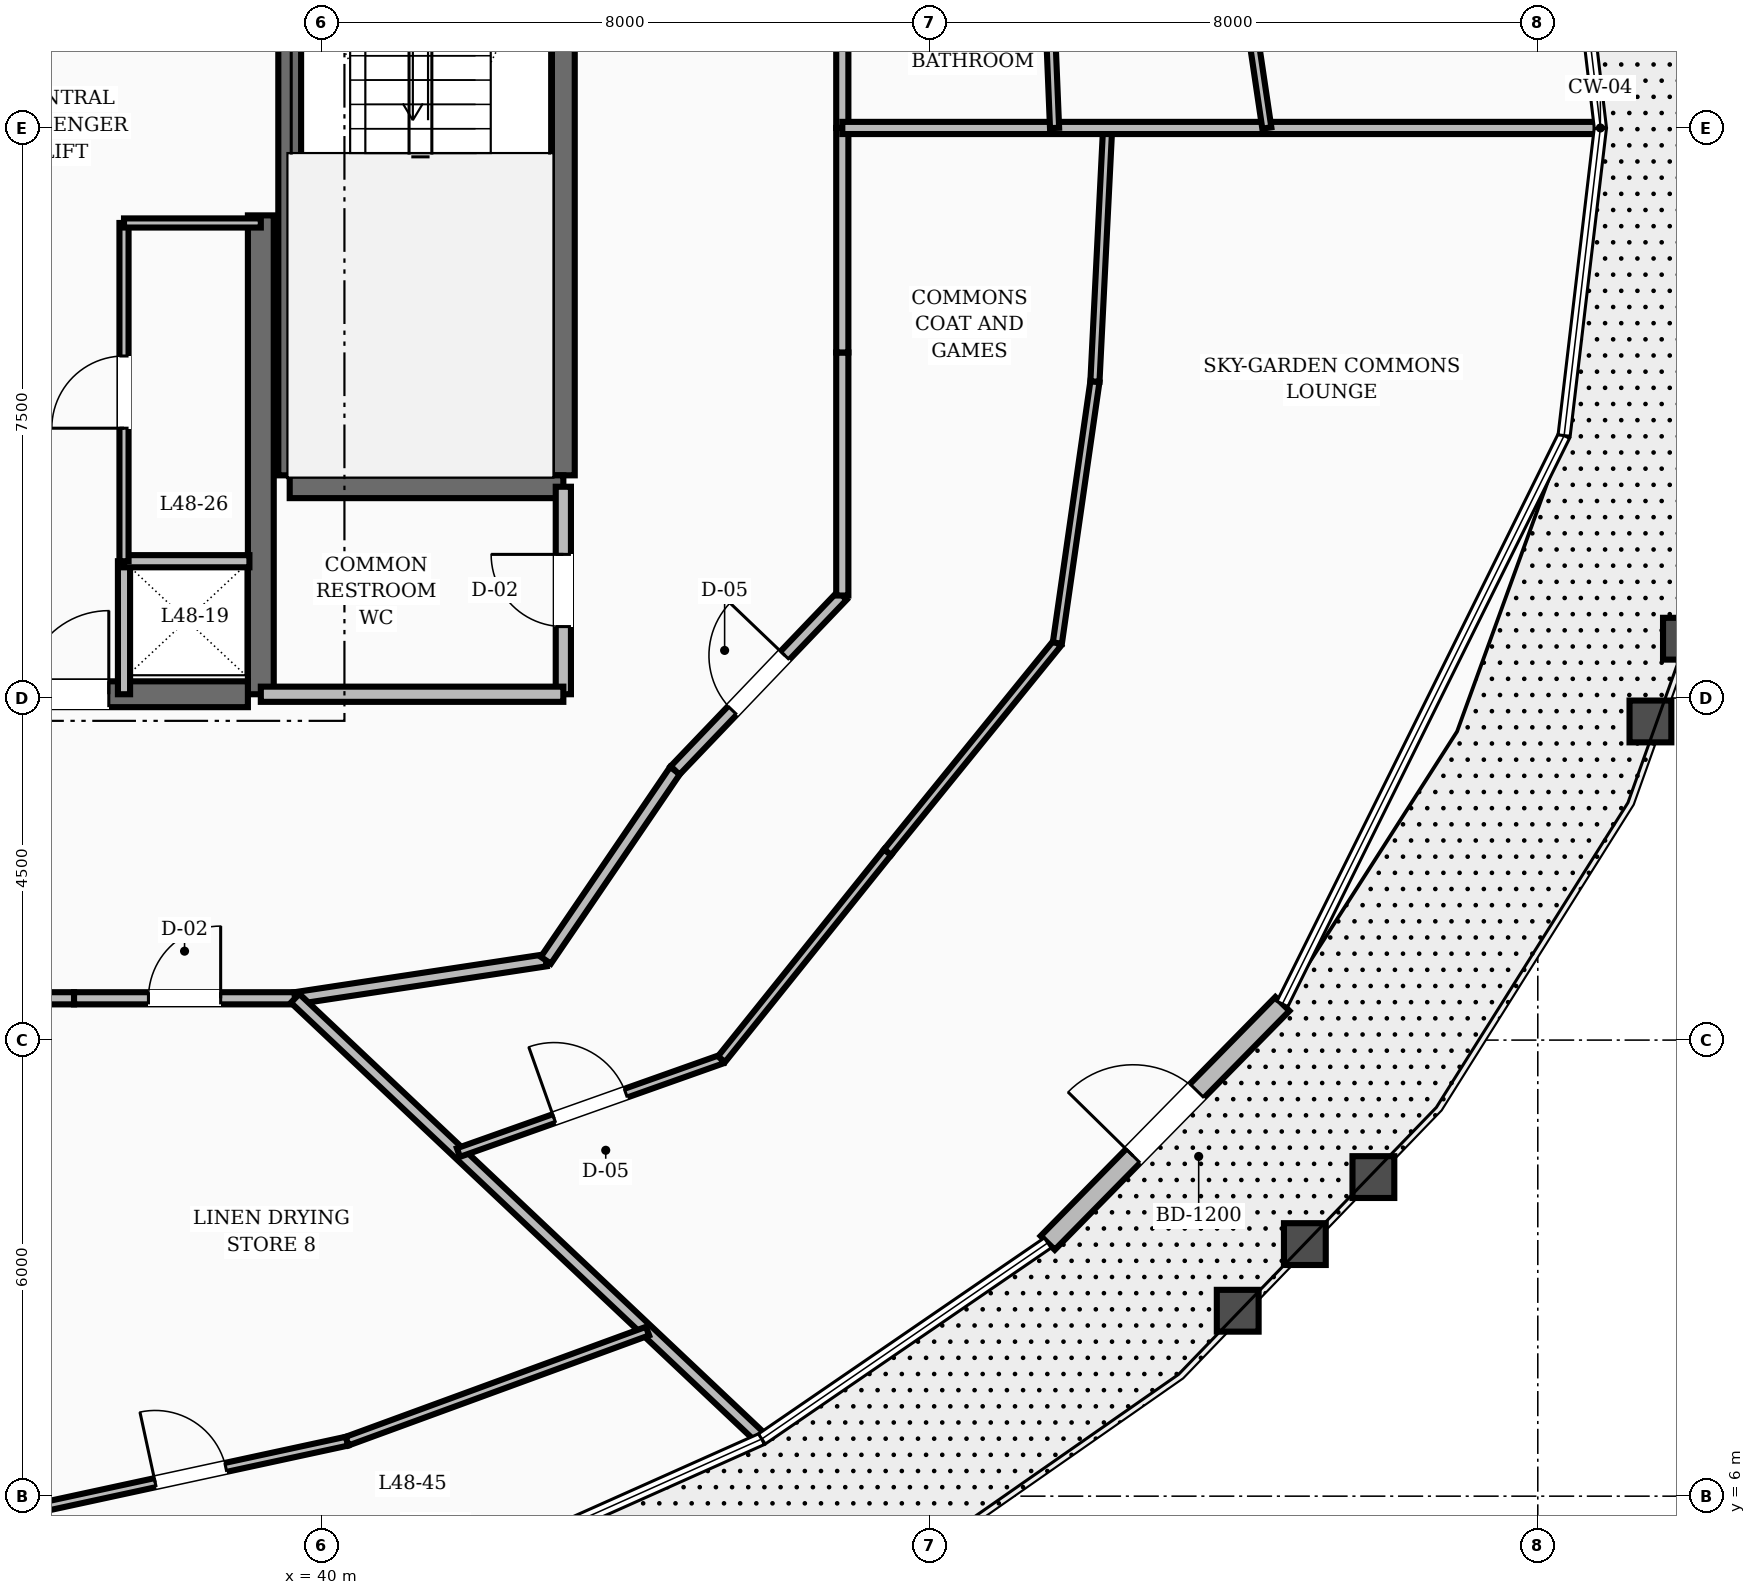
"""IFC4 building model, lengths in metres.
Left out: names, types, materials, properties, quantities, classifications, styles, units other than length and angle.
Written with IfcOpenShell. Run it as: python <this file> out.ifc"""

import sys

from ifc_helpers import new_model, si_unit, direction, frame, frame_2d, origin, place, context, subcontext, project, spatial, rectangle, extrude, element, fill, save


model = new_model("IFC4")
c1 = context("Model", 3, precision=1e-05, world=origin(), true_north=direction((0.0, 1.0)))
c2 = subcontext(c1, "Body", "Model", "MODEL_VIEW")
j1 = project(units=[si_unit("LENGTHUNIT", "METRE"), si_unit("PLANEANGLEUNIT", "RADIAN")], contexts=[c1])
p1 = place(None, origin())
s1 = spatial("IfcSite", under=j1, at=p1, CompositionType="ELEMENT")
p2 = place(p1, origin())
s2 = spatial("IfcBuilding", under=s1, at=p2, CompositionType="ELEMENT")
p3 = place(p2, frame((0.0, 0.0, 185.6)))
s3 = spatial("IfcBuildingStorey", under=s2, at=p3, CompositionType="ELEMENT", Elevation=185.6)
p4 = place(p3, frame((39.2, 16.55, 0.0), z_axis=(0.0, 0.0, 1.0), x_axis=(0.0, 1.0, 0.0)))
e1 = element("IfcWall", 1, at=p4, inside=s3, PredefinedType="SHEAR", context=c2, shape_type="SweptSolid", body=[
    extrude(rectangle(XDim=6.3, YDim=0.34, at=frame_2d((3.15, 0.0))), origin(), (0.0, 0.0, 1.0), 3.6),
])
p5 = place(p3, frame((35.8, 16.55, 0.0), z_axis=(0.0, 0.0, 1.0), x_axis=(1.0, 0.0, 0.0)))
e2 = element("IfcWall", 2, at=p5, inside=s3, PredefinedType="SHEAR", context=c2, shape_type="SweptSolid", body=[
    extrude(rectangle(XDim=3.23, YDim=0.34, at=frame_2d((1.615, 0.0))), origin(), (0.0, 0.0, 1.0), 3.6),
])
p6 = place(p5, frame((0.3, 0.0, 0.0)))
e3 = element("IfcOpeningElement", 3, at=p6, cuts=e2, PredefinedType="OPENING", context=c2, shape_type="SweptSolid", body=[
    extrude(rectangle(XDim=1.1, YDim=2.1, at=frame_2d((0.55, 1.05))), frame((0.0, 0.18, 0.0), z_axis=(0.0, -1.0, 0.0), x_axis=(1.0, 0.0, 0.0)), (0.0, 0.0, 1.0), 0.36),
])
for number, where, z_axis, x_axis in (
    (4, (43.18, 19.43, 0.0), (0.0, 0.0, 1.0), (0.0, 1.0, 0.0)),
    (5, (39.58, 19.43, 0.0), (0.0, 0.0, 1.0), (0.0, 1.0, 0.0)),
):
    element("IfcWall", number, at=place(p3, frame(where, z_axis=z_axis, x_axis=x_axis)), inside=s3, PredefinedType="SHEAR", context=c2, shape_type="SweptSolid", body=[
        extrude(rectangle(XDim=8.74, YDim=0.3, at=frame_2d((4.37, 0.0))), origin(), (0.0, 0.0, 1.0), 3.6),
    ])
p7 = place(p3, frame((39.58, 19.28, 0.0), z_axis=(0.0, 0.0, 1.0), x_axis=(1.0, 0.0, 0.0)))
e6 = element("IfcWall", 6, at=p7, inside=s3, PredefinedType="SHEAR", context=c2, shape_type="SweptSolid", body=[
    extrude(rectangle(XDim=3.6, YDim=0.3, at=frame_2d((1.8, 0.0))), origin(), (0.0, 0.0, 1.0), 3.6),
])
p8 = place(p3, frame((49.553, 9.332, 0.0), z_axis=(0.0, 0.0, 1.0), x_axis=(0.700677794734, 0.713477839857, 0.0)))
e7 = element("IfcWall", 7, at=p8, inside=s3, PredefinedType="STANDARD", context=c2, shape_type="SweptSolid", body=[
    extrude(rectangle(XDim=4.406, YDim=0.26, at=frame_2d((2.203, 0.0))), origin(), (0.0, 0.0, 1.0), 2.82),
])
p9 = place(p8, frame((1.603, 0.0, 0.0)))
e8 = element("IfcOpeningElement", 8, at=p9, cuts=e7, PredefinedType="OPENING", context=c2, shape_type="SweptSolid", body=[
    extrude(rectangle(XDim=1.2, YDim=2.15, at=frame_2d((0.6, 1.075))), frame((0.0, 0.14, 0.0), z_axis=(0.0, -1.0, 0.0), x_axis=(1.0, 0.0, 0.0)), (0.0, 0.0, 1.0), 0.28),
])
p10 = place(p3, frame((43.18, 16.55, 0.0), z_axis=(0.0, 0.0, 1.0), x_axis=(0.0, 1.0, 0.0)))
e9 = element("IfcWall", 9, at=p10, inside=s3, PredefinedType="SOLIDWALL", context=c2, shape_type="SweptSolid", body=[
    extrude(rectangle(XDim=2.73, YDim=0.2, at=frame_2d((1.365, 0.0))), origin(), (0.0, 0.0, 1.0), 2.8),
])
p11 = place(p10, frame((0.89, 0.0, 0.0)))
e10 = element("IfcOpeningElement", 10, at=p11, cuts=e9, PredefinedType="OPENING", context=c2, shape_type="SweptSolid", body=[
    extrude(rectangle(XDim=0.95, YDim=2.1, at=frame_2d((0.475, 1.05))), frame((0.0, 0.11, 0.0), z_axis=(0.0, -1.0, 0.0), x_axis=(1.0, 0.0, 0.0)), (0.0, 0.0, 1.0), 0.22),
])
p12 = place(p3, frame((39.2, 16.55, 0.0), z_axis=(0.0, 0.0, 1.0), x_axis=(1.0, 0.0, 0.0)))
e11 = element("IfcWall", 11, at=p12, inside=s3, PredefinedType="SOLIDWALL", context=c2, shape_type="SweptSolid", body=[
    extrude(rectangle(XDim=3.98, YDim=0.2, at=frame_2d((1.99, 0.0))), origin(), (0.0, 0.0, 1.0), 2.8),
])
p13 = place(p3, frame((37.4, 16.55, 0.0), z_axis=(0.0, 0.0, 1.0), x_axis=(0.0, 1.0, 0.0)))
e12 = element("IfcWall", 12, at=p13, inside=s3, PredefinedType="SOLIDWALL", context=c2, shape_type="SweptSolid", body=[
    extrude(rectangle(XDim=1.75, YDim=0.16, at=frame_2d((0.875, 0.0))), origin(), (0.0, 0.0, 1.0), 2.8),
])
p14 = place(p3, frame((37.4, 18.3, 0.0), z_axis=(0.0, 0.0, 1.0), x_axis=(1.0, 0.0, 0.0)))
e13 = element("IfcWall", 13, at=p14, inside=s3, PredefinedType="SOLIDWALL", context=c2, shape_type="SweptSolid", body=[
    extrude(rectangle(XDim=1.65, YDim=0.16, at=frame_2d((0.825, 0.0))), origin(), (0.0, 0.0, 1.0), 2.8),
])
p15 = place(p3, frame((37.4, 18.3, 0.0), z_axis=(0.0, 0.0, 1.0), x_axis=(0.0, 1.0, 0.0)))
e14 = element("IfcWall", 14, at=p15, inside=s3, PredefinedType="PARTITIONING", context=c2, shape_type="SweptSolid", body=[
    extrude(rectangle(XDim=4.45, YDim=0.12, at=frame_2d((2.225, 0.0))), origin(), (0.0, 0.0, 1.0), 2.8),
])
p16 = place(p15, frame((1.75, 0.0, 0.0)))
e15 = element("IfcOpeningElement", 15, at=p16, cuts=e14, PredefinedType="OPENING", context=c2, shape_type="SweptSolid", body=[
    extrude(rectangle(XDim=0.95, YDim=2.1, at=frame_2d((0.475, 1.05))), frame((0.0, 0.07, 0.0), z_axis=(0.0, -1.0, 0.0), x_axis=(1.0, 0.0, 0.0)), (0.0, 0.0, 1.0), 0.14),
])
p17 = place(p3, frame((37.4, 22.75, 0.0), z_axis=(0.0, 0.0, 1.0), x_axis=(1.0, 0.0, 0.0)))
e16 = element("IfcWall", 16, at=p17, inside=s3, PredefinedType="PARTITIONING", context=c2, shape_type="SweptSolid", body=[
    extrude(rectangle(XDim=1.8, YDim=0.12, at=frame_2d((0.9, 0.0))), origin(), (0.0, 0.0, 1.0), 2.8),
])
p18 = place(p3, frame((46.85, 24.0, 0.0), z_axis=(0.0, 0.0, 1.0), x_axis=(0.0, 1.0, 0.0)))
e17 = element("IfcWall", 17, at=p18, inside=s3, PredefinedType="SOLIDWALL", context=c2, shape_type="SweptSolid", body=[
    extrude(rectangle(XDim=2.954, YDim=0.16, at=frame_2d((1.477, 0.0))), origin(), (0.0, 0.0, 1.0), 2.8),
])
p19 = place(p3, frame((34.278, 12.55, 0.0), z_axis=(0.0, 0.0, 1.0), x_axis=(1.0, 0.0, 0.0)))
e18 = element("IfcWall", 18, at=p19, inside=s3, PredefinedType="SOLIDWALL", context=c2, shape_type="SweptSolid", body=[
    extrude(rectangle(XDim=2.465, YDim=0.16, at=frame_2d((1.232, 0.0))), origin(), (0.0, 0.0, 1.0), 2.8),
])
p20 = place(p3, frame((36.743, 12.55, 0.0), z_axis=(0.0, 0.0, 1.0), x_axis=(1.0, 0.0, 0.0)))
e19 = element("IfcWall", 19, at=p20, inside=s3, PredefinedType="SOLIDWALL", context=c2, shape_type="SweptSolid", body=[
    extrude(rectangle(XDim=2.908, YDim=0.16, at=frame_2d((1.454, 0.0))), origin(), (0.0, 0.0, 1.0), 2.8),
])
p21 = place(p20, frame((0.979, 0.0, 0.0)))
e20 = element("IfcOpeningElement", 20, at=p21, cuts=e19, PredefinedType="OPENING", context=c2, shape_type="SweptSolid", body=[
    extrude(rectangle(XDim=0.95, YDim=2.1, at=frame_2d((0.475, 1.05))), frame((0.0, 0.09, 0.0), z_axis=(0.0, -1.0, 0.0), x_axis=(1.0, 0.0, 0.0)), (0.0, 0.0, 1.0), 0.18),
])
p22 = place(p3, frame((39.651, 12.55, 0.0), z_axis=(0.0, 0.0, 1.0), x_axis=(0.988710906508, 0.149835721217, 0.0)))
e21 = element("IfcWall", 21, at=p22, inside=s3, PredefinedType="SOLIDWALL", context=c2, shape_type="SweptSolid", body=[
    extrude(rectangle(XDim=3.337, YDim=0.16, at=frame_2d((1.668, 0.0))), origin(), (0.0, 0.0, 1.0), 2.8),
])
p23 = place(p3, frame((42.95, 13.05, 0.0), z_axis=(0.0, 0.0, 1.0), x_axis=(0.562674669208, 0.826678423955, 0.0)))
e22 = element("IfcWall", 22, at=p23, inside=s3, PredefinedType="SOLIDWALL", context=c2, shape_type="SweptSolid", body=[
    extrude(rectangle(XDim=3.021, YDim=0.16, at=frame_2d((1.511, 0.0))), origin(), (0.0, 0.0, 1.0), 2.8),
])
p24 = place(p3, frame((44.65, 15.548, 0.0), z_axis=(0.0, 0.0, 1.0), x_axis=(0.691055487108, 0.722801711216, 0.0)))
e23 = element("IfcWall", 23, at=p24, inside=s3, PredefinedType="SOLIDWALL", context=c2, shape_type="SweptSolid", body=[
    extrude(rectangle(XDim=3.184, YDim=0.16, at=frame_2d((1.592, 0.0))), origin(), (0.0, 0.0, 1.0), 2.8),
])
p25 = place(p24, frame((1.092, 0.0, 0.0)))
e24 = element("IfcOpeningElement", 24, at=p25, cuts=e23, PredefinedType="OPENING", context=c2, shape_type="SweptSolid", body=[
    extrude(rectangle(XDim=1.0, YDim=2.1, at=frame_2d((0.5, 1.05))), frame((0.0, 0.09, 0.0), z_axis=(0.0, -1.0, 0.0), x_axis=(1.0, 0.0, 0.0)), (0.0, 0.0, 1.0), 0.18),
])
p26 = place(p3, frame((46.85, 17.849, 0.0), z_axis=(0.0, 0.0, 1.0), x_axis=(0.0, 1.0, 0.0)))
e25 = element("IfcWall", 25, at=p26, inside=s3, PredefinedType="SOLIDWALL", context=c2, shape_type="SweptSolid", body=[
    extrude(rectangle(XDim=3.197, YDim=0.16, at=frame_2d((1.599, 0.0))), origin(), (0.0, 0.0, 1.0), 2.8),
])
p27 = place(p3, frame((46.85, 21.046, 0.0), z_axis=(0.0, 0.0, 1.0), x_axis=(0.0, 1.0, 0.0)))
e26 = element("IfcWall", 26, at=p27, inside=s3, PredefinedType="SOLIDWALL", context=c2, shape_type="SweptSolid", body=[
    extrude(rectangle(XDim=2.954, YDim=0.16, at=frame_2d((1.477, 0.0))), origin(), (0.0, 0.0, 1.0), 2.8),
])
p28 = place(p3, frame((39.651, 12.55, 0.0), z_axis=(0.0, 0.0, 1.0), x_axis=(0.727100249426, -0.686531301024, 0.0)))
e27 = element("IfcWall", 27, at=p28, inside=s3, PredefinedType="SOLIDWALL", context=c2, shape_type="SweptSolid", body=[
    extrude(rectangle(XDim=8.395, YDim=0.16, at=frame_2d((4.198, 0.0))), origin(), (0.0, 0.0, 1.0), 2.8),
])
p29 = place(p3, frame((41.8, 10.521, 0.0), z_axis=(0.0, 0.0, 1.0), x_axis=(0.942439233955, 0.334377466798, 0.0)))
e28 = element("IfcWall", 28, at=p29, inside=s3, PredefinedType="PARTITIONING", context=c2, shape_type="SweptSolid", body=[
    extrude(rectangle(XDim=3.673, YDim=0.12, at=frame_2d((1.836, 0.0))), origin(), (0.0, 0.0, 1.0), 2.8),
])
p30 = place(p29, frame((1.336, 0.0, 0.0)))
e29 = element("IfcOpeningElement", 29, at=p30, cuts=e28, PredefinedType="OPENING", context=c2, shape_type="SweptSolid", body=[
    extrude(rectangle(XDim=1.0, YDim=2.1, at=frame_2d((0.5, 1.05))), frame((0.0, 0.07, 0.0), z_axis=(0.0, -1.0, 0.0), x_axis=(1.0, 0.0, 0.0)), (0.0, 0.0, 1.0), 0.14),
])
p31 = place(p3, frame((45.261, 11.749, 0.0), z_axis=(0.0, 0.0, 1.0), x_axis=(0.625853878004, 0.779940333223, 0.0)))
e30 = element("IfcWall", 30, at=p31, inside=s3, PredefinedType="PARTITIONING", context=c2, shape_type="SweptSolid", body=[
    extrude(rectangle(XDim=3.492, YDim=0.12, at=frame_2d((1.746, 0.0))), origin(), (0.0, 0.0, 1.0), 2.8),
])
p32 = place(p3, frame((47.447, 14.472, 0.0), z_axis=(0.0, 0.0, 1.0), x_axis=(0.630167081939, 0.776459560338, 0.0)))
e31 = element("IfcWall", 31, at=p32, inside=s3, PredefinedType="PARTITIONING", context=c2, shape_type="SweptSolid", body=[
    extrude(rectangle(XDim=3.543, YDim=0.12, at=frame_2d((1.771, 0.0))), origin(), (0.0, 0.0, 1.0), 2.8),
])
p33 = place(p3, frame((49.679, 17.223, 0.0), z_axis=(0.0, 0.0, 1.0), x_axis=(0.142247395577, 0.989831136332, 0.0)))
e32 = element("IfcWall", 32, at=p33, inside=s3, PredefinedType="PARTITIONING", context=c2, shape_type="SweptSolid", body=[
    extrude(rectangle(XDim=3.476, YDim=0.12, at=frame_2d((1.738, 0.0))), origin(), (0.0, 0.0, 1.0), 2.8),
])
p34 = place(p3, frame((50.174, 20.664, 0.0), z_axis=(0.0, 0.0, 1.0), x_axis=(0.050061547069, 0.998746134663, 0.0)))
e33 = element("IfcWall", 33, at=p34, inside=s3, PredefinedType="PARTITIONING", context=c2, shape_type="SweptSolid", body=[
    extrude(rectangle(XDim=3.341, YDim=0.12, at=frame_2d((1.67, 0.0))), origin(), (0.0, 0.0, 1.0), 2.8),
])
p35 = place(p3, frame((46.85, 24.0, 0.0), z_axis=(0.0, 0.0, 1.0), x_axis=(1.0, 0.0, 0.0)))
e34 = element("IfcWall", 34, at=p35, inside=s3, PredefinedType="SOLIDWALL", context=c2, shape_type="SweptSolid", body=[
    extrude(rectangle(XDim=9.923, YDim=0.16, at=frame_2d((4.962, 0.0))), origin(), (0.0, 0.0, 1.0), 2.8),
])
p36 = place(p3, frame((49.643, 24.0, 0.0), z_axis=(0.0, 0.0, 1.0), x_axis=(-0.040930249188, 0.999162006234, 0.0)))
e35 = element("IfcWall", 35, at=p36, inside=s3, PredefinedType="PARTITIONING", context=c2, shape_type="SweptSolid", body=[
    extrude(rectangle(XDim=3.263, YDim=0.12, at=frame_2d((1.631, 0.0))), origin(), (0.0, 0.0, 1.0), 2.8),
])
p37 = place(p3, frame((52.435, 24.0, 0.0), z_axis=(0.0, 0.0, 1.0), x_axis=(-0.146355290516, 0.989232090532, 0.0)))
e36 = element("IfcWall", 36, at=p37, inside=s3, PredefinedType="PARTITIONING", context=c2, shape_type="SweptSolid", body=[
    extrude(rectangle(XDim=7.23, YDim=0.12, at=frame_2d((3.615, 0.0))), origin(), (0.0, 0.0, 1.0), 2.8),
])
p38 = place(p37, frame((4.328, 0.0, 0.0)))
e37 = element("IfcOpeningElement", 37, at=p38, cuts=e36, PredefinedType="OPENING", context=c2, shape_type="SweptSolid", body=[
    extrude(rectangle(XDim=0.95, YDim=2.1, at=frame_2d((0.475, 1.05))), frame((0.0, 0.07, 0.0), z_axis=(0.0, -1.0, 0.0), x_axis=(1.0, 0.0, 0.0)), (0.0, 0.0, 1.0), 0.14),
])
p39 = place(p3, frame((34.278, 12.55, 0.0), z_axis=(0.0, 0.0, 1.0), x_axis=(0.277080625879, -0.960846671828, 0.0)))
e38 = element("IfcWall", 38, at=p39, inside=s3, PredefinedType="SOLIDWALL", context=c2, shape_type="SweptSolid", body=[
    extrude(rectangle(XDim=9.208, YDim=0.16, at=frame_2d((4.604, 0.0))), origin(), (0.0, 0.0, 1.0), 2.8),
])
p40 = place(p3, frame((36.215, 5.833, 0.0), z_axis=(0.0, 0.0, 1.0), x_axis=(0.977391204778, 0.211438957673, 0.0)))
e39 = element("IfcWall", 39, at=p40, inside=s3, PredefinedType="PARTITIONING", context=c2, shape_type="SweptSolid", body=[
    extrude(rectangle(XDim=4.216, YDim=0.12, at=frame_2d((2.108, 0.0))), origin(), (0.0, 0.0, 1.0), 2.8),
])
p41 = place(p40, frame((1.633, 0.0, 0.0)))
e40 = element("IfcOpeningElement", 40, at=p41, cuts=e39, PredefinedType="OPENING", context=c2, shape_type="SweptSolid", body=[
    extrude(rectangle(XDim=0.95, YDim=2.1, at=frame_2d((0.475, 1.05))), frame((0.0, 0.07, 0.0), z_axis=(0.0, -1.0, 0.0), x_axis=(1.0, 0.0, 0.0)), (0.0, 0.0, 1.0), 0.14),
])
p42 = place(p3, frame((40.335, 6.724, 0.0), z_axis=(0.0, 0.0, 1.0), x_axis=(0.939020571254, 0.343860970105, 0.0)))
e41 = element("IfcWall", 41, at=p42, inside=s3, PredefinedType="PARTITIONING", context=c2, shape_type="SweptSolid", body=[
    extrude(rectangle(XDim=4.209, YDim=0.12, at=frame_2d((2.105, 0.0))), origin(), (0.0, 0.0, 1.0), 2.8),
])
p43 = place(p9, origin())
e42 = element("IfcDoor", 42, at=p43, inside=s3, OperationType="SINGLE_SWING_LEFT", PredefinedType="DOOR", context=c2, shape_type="SweptSolid", body=[
    extrude(rectangle(XDim=1.2, YDim=2.15, at=frame_2d((0.6, 1.075))), frame((0.0, 0.025, 0.0), z_axis=(0.0, -1.0, 0.0), x_axis=(1.0, 0.0, 0.0)), (0.0, 0.0, 1.0), 0.05),
])
fill(e8, e42)
p44 = place(p11, origin())
e43 = element("IfcDoor", 43, at=p44, inside=s3, OperationType="SINGLE_SWING_RIGHT", PredefinedType="DOOR", context=c2, shape_type="SweptSolid", body=[
    extrude(rectangle(XDim=0.95, YDim=2.1, at=frame_2d((0.475, 1.05))), frame((0.0, 0.025, 0.0), z_axis=(0.0, -1.0, 0.0), x_axis=(1.0, 0.0, 0.0)), (0.0, 0.0, 1.0), 0.05),
])
fill(e10, e43)
p45 = place(p6, origin())
e44 = element("IfcDoor", 44, at=p45, inside=s3, OperationType="SINGLE_SWING_RIGHT", PredefinedType="DOOR", context=c2, shape_type="SweptSolid", body=[
    extrude(rectangle(XDim=1.1, YDim=2.1, at=frame_2d((0.55, 1.05))), frame((0.0, 0.025, 0.0), z_axis=(0.0, -1.0, 0.0), x_axis=(1.0, 0.0, 0.0)), (0.0, 0.0, 1.0), 0.05),
])
fill(e3, e44)
p46 = place(p16, origin())
e45 = element("IfcDoor", 45, at=p46, inside=s3, OperationType="SINGLE_SWING_LEFT", PredefinedType="DOOR", context=c2, shape_type="SweptSolid", body=[
    extrude(rectangle(XDim=0.95, YDim=2.1, at=frame_2d((0.475, 1.05))), frame((0.0, 0.025, 0.0), z_axis=(0.0, -1.0, 0.0), x_axis=(1.0, 0.0, 0.0)), (0.0, 0.0, 1.0), 0.05),
])
fill(e15, e45)
p47 = place(p25, origin())
e46 = element("IfcDoor", 46, at=p47, inside=s3, OperationType="SINGLE_SWING_RIGHT", PredefinedType="DOOR", context=c2, shape_type="SweptSolid", body=[
    extrude(rectangle(XDim=1.0, YDim=2.1, at=frame_2d((0.5, 1.05))), frame((0.0, 0.025, 0.0), z_axis=(0.0, -1.0, 0.0), x_axis=(1.0, 0.0, 0.0)), (0.0, 0.0, 1.0), 0.05),
])
fill(e24, e46)
p48 = place(p30, origin())
e47 = element("IfcDoor", 47, at=p48, inside=s3, OperationType="SINGLE_SWING_LEFT", PredefinedType="DOOR", context=c2, shape_type="SweptSolid", body=[
    extrude(rectangle(XDim=1.0, YDim=2.1, at=frame_2d((0.5, 1.05))), frame((0.0, 0.025, 0.0), z_axis=(0.0, -1.0, 0.0), x_axis=(1.0, 0.0, 0.0)), (0.0, 0.0, 1.0), 0.05),
])
fill(e29, e47)
p49 = place(p21, origin())
e48 = element("IfcDoor", 48, at=p49, inside=s3, OperationType="SINGLE_SWING_RIGHT", PredefinedType="DOOR", context=c2, shape_type="SweptSolid", body=[
    extrude(rectangle(XDim=0.95, YDim=2.1, at=frame_2d((0.475, 1.05))), frame((0.0, 0.025, 0.0), z_axis=(0.0, -1.0, 0.0), x_axis=(1.0, 0.0, 0.0)), (0.0, 0.0, 1.0), 0.05),
])
fill(e20, e48)
p50 = place(p41, origin())
e49 = element("IfcDoor", 49, at=p50, inside=s3, OperationType="SINGLE_SWING_LEFT", PredefinedType="DOOR", context=c2, shape_type="SweptSolid", body=[
    extrude(rectangle(XDim=0.95, YDim=2.1, at=frame_2d((0.475, 1.05))), frame((0.0, 0.025, 0.0), z_axis=(0.0, -1.0, 0.0), x_axis=(1.0, 0.0, 0.0)), (0.0, 0.0, 1.0), 0.05),
])
fill(e40, e49)
save(model, sys.argv[1])
